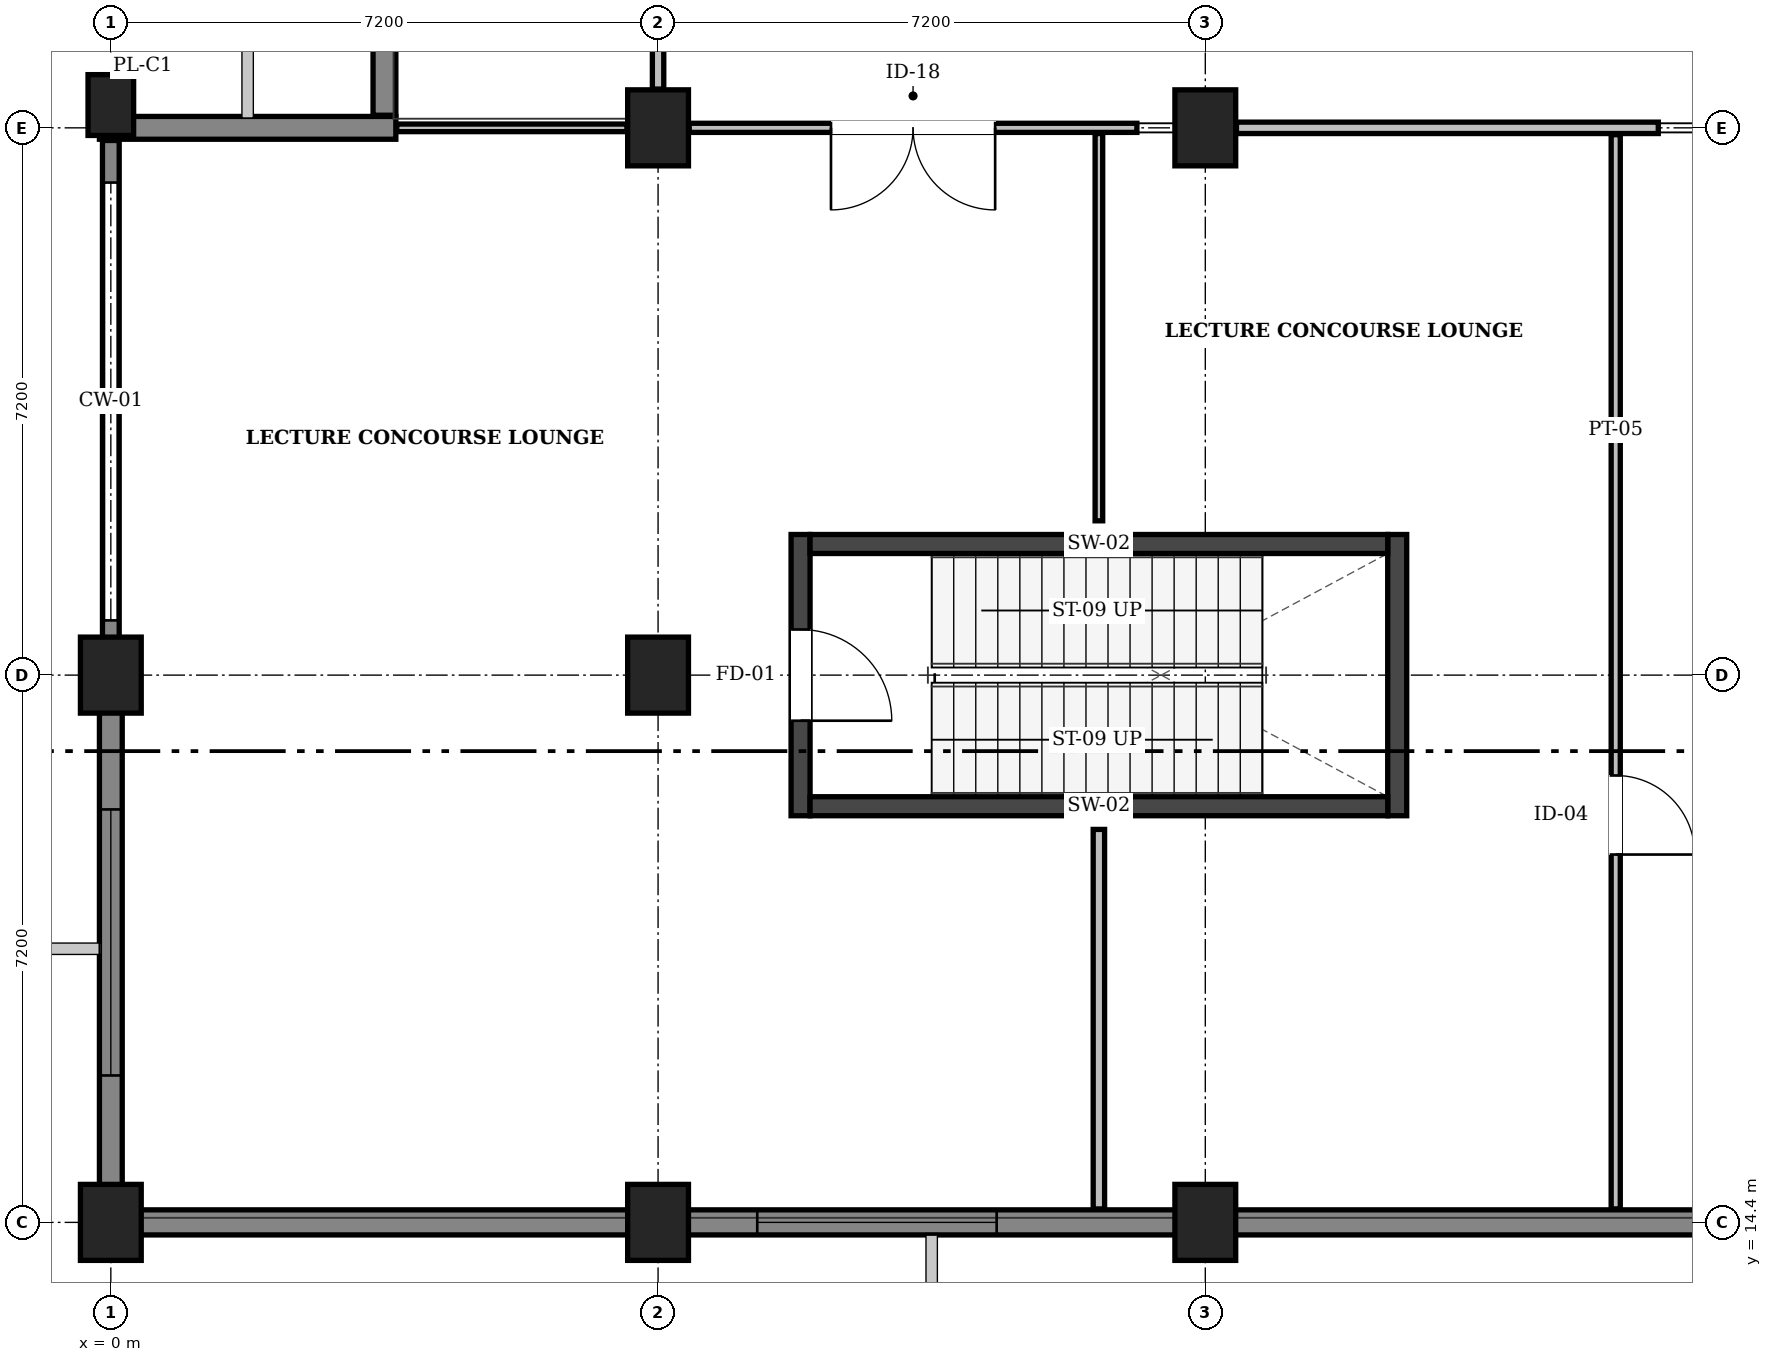
"""IFC4 building model, lengths in metres.
Left out: names, types, materials, properties, quantities, classifications, styles, units other than length and angle.
Written with IfcOpenShell. Run it as: python <this file> out.ifc"""

import sys

from ifc_helpers import new_model, si_unit, direction, frame, frame_2d, origin, origin_2d, place, context, subcontext, project, spatial, rectangle, extrude, element, fill, save


model = new_model("IFC4")
c1 = context("Model", 3, precision=1e-05, world=origin(), true_north=direction((0.0, 1.0)))
c2 = subcontext(c1, "Body", "Model", "MODEL_VIEW")
j1 = project(units=[si_unit("LENGTHUNIT", "METRE"), si_unit("PLANEANGLEUNIT", "RADIAN")], contexts=[c1])
p1 = place(None, origin())
s1 = spatial("IfcSite", under=j1, at=p1, CompositionType="ELEMENT")
p2 = place(p1, origin())
s2 = spatial("IfcBuilding", under=s1, at=p2, CompositionType="ELEMENT")
p3 = place(p2, frame((0.0, 0.0, 4.8)))
s3 = spatial("IfcBuildingStorey", under=s2, at=p3, CompositionType="ELEMENT", Elevation=4.8)
for number, where, z_axis, x_axis in (
    (1, (0.0, 14.4, 0.0), (0.0, 0.0, 1.0), (1.0, 0.0, 0.0)),
    (2, (0.0, 21.6, 0.0), (0.0, 0.0, 1.0), (1.0, 0.0, 0.0)),
):
    element("IfcColumn", number, at=place(p3, frame(where, z_axis=z_axis, x_axis=x_axis)), inside=s3, PredefinedType="COLUMN", context=c2, shape_type="SweptSolid", body=[
        extrude(rectangle(XDim=0.8, YDim=1.0, at=origin_2d()), origin(), (0.0, 0.0, 1.0), 4.8),
    ])
p4 = place(p3, frame((0.0, 29.1, 0.028), z_axis=(0.0, -0.062750190136, 0.998029264921), x_axis=(1.0, 0.0, 0.0)))
e3 = element("IfcColumn", 3, at=p4, inside=s3, PredefinedType="PILASTER", context=c2, shape_type="SweptSolid", body=[
    extrude(rectangle(XDim=0.6, YDim=0.8, at=origin_2d()), origin(), (0.0, 0.0, 1.0), 4.782),
])
for number, where, z_axis, x_axis in (
    (4, (7.2, 14.4, 0.0), (0.0, 0.0, 1.0), (1.0, 0.0, 0.0)),
    (5, (7.2, 21.6, 0.0), (0.0, 0.0, 1.0), (1.0, 0.0, 0.0)),
    (6, (7.2, 28.8, 0.0), (0.0, 0.0, 1.0), (1.0, 0.0, 0.0)),
    (7, (14.4, 14.4, 0.0), (0.0, 0.0, 1.0), (1.0, 0.0, 0.0)),
    (8, (14.4, 28.8, 0.0), (0.0, 0.0, 1.0), (1.0, 0.0, 0.0)),
):
    element("IfcColumn", number, at=place(p3, frame(where, z_axis=z_axis, x_axis=x_axis)), inside=s3, PredefinedType="COLUMN", context=c2, shape_type="SweptSolid", body=[
        extrude(rectangle(XDim=0.8, YDim=1.0, at=origin_2d()), origin(), (0.0, 0.0, 1.0), 4.8),
    ])
p5 = place(p3, frame((21.6, 14.4, 0.0), z_axis=(0.0, 0.0, 1.0), x_axis=(-1.0, 0.0, 0.0)))
e9 = element("IfcWall", 9, at=p5, inside=s3, PredefinedType="SOLIDWALL", context=c2, shape_type="SweptSolid", body=[
    extrude(rectangle(XDim=7.2, YDim=0.33, at=frame_2d((3.6, 0.0))), origin(), (0.0, 0.0, 1.0), 4.52),
])
p6 = place(p3, frame((14.4, 14.4, 0.0), z_axis=(0.0, 0.0, 1.0), x_axis=(-1.0, 0.0, 0.0)))
e10 = element("IfcWall", 10, at=p6, inside=s3, PredefinedType="SOLIDWALL", context=c2, shape_type="SweptSolid", body=[
    extrude(rectangle(XDim=7.2, YDim=0.33, at=frame_2d((3.6, 0.0))), origin(), (0.0, 0.0, 1.0), 4.52),
])
p7 = place(p6, frame((2.745, 0.0, 0.95)))
e11 = element("IfcOpeningElement", 11, at=p7, cuts=e10, PredefinedType="OPENING", context=c2, shape_type="SweptSolid", body=[
    extrude(rectangle(XDim=3.15, YDim=1.8, at=frame_2d((1.575, 0.9))), frame((0.0, 0.177, 0.0), z_axis=(0.0, -1.0, 0.0), x_axis=(1.0, 0.0, 0.0)), (0.0, 0.0, 1.0), 0.354),
])
p8 = place(p3, frame((7.2, 14.4, 0.0), z_axis=(0.0, 0.0, 1.0), x_axis=(-1.0, 0.0, 0.0)))
e12 = element("IfcWall", 12, at=p8, inside=s3, PredefinedType="SOLIDWALL", context=c2, shape_type="SweptSolid", body=[
    extrude(rectangle(XDim=7.35, YDim=0.33, at=frame_2d((3.675, 0.0))), origin(), (0.0, 0.0, 1.0), 4.52),
])
p9 = place(p3, frame((0.0, 14.566, 0.0), z_axis=(0.0, 0.0, 1.0), x_axis=(0.0, 1.0, 0.0)))
e13 = element("IfcWall", 13, at=p9, inside=s3, PredefinedType="SOLIDWALL", context=c2, shape_type="SweptSolid", body=[
    extrude(rectangle(XDim=7.034, YDim=0.3, at=frame_2d((3.517, 0.0))), origin(), (0.0, 0.0, 1.0), 4.52),
])
p10 = place(p9, frame((1.767, 0.0, 0.95)))
e14 = element("IfcOpeningElement", 14, at=p10, cuts=e13, PredefinedType="OPENING", context=c2, shape_type="SweptSolid", body=[
    extrude(rectangle(XDim=3.5, YDim=1.8, at=frame_2d((1.75, 0.9))), frame((0.0, 0.162, 0.0), z_axis=(0.0, -1.0, 0.0), x_axis=(1.0, 0.0, 0.0)), (0.0, 0.0, 1.0), 0.324),
])
p11 = place(p3, frame((0.0, 21.6, 0.0), z_axis=(0.0, 0.0, 1.0), x_axis=(0.0, 1.0, 0.0)))
e15 = element("IfcWall", 15, at=p11, inside=s3, PredefinedType="SOLIDWALL", context=c2, shape_type="SweptSolid", body=[
    extrude(rectangle(XDim=7.034, YDim=0.22, at=frame_2d((3.517, 0.0))), origin(), (0.0, 0.0, 1.0), 1.24),
])
p12 = place(p3, frame((-0.15, 28.8, 0.0), z_axis=(0.0, 0.0, 1.0), x_axis=(1.0, 0.0, 0.0)))
e16 = element("IfcWall", 16, at=p12, inside=s3, PredefinedType="SOLIDWALL", context=c2, shape_type="SweptSolid", body=[
    extrude(rectangle(XDim=3.9, YDim=0.3, at=frame_2d((1.95, 0.0))), origin(), (0.0, 0.0, 1.0), 4.52),
])
p13 = place(p3, frame((3.6, 28.966, 0.0), z_axis=(0.0, 0.0, 1.0), x_axis=(0.0, 1.0, 0.0)))
e17 = element("IfcWall", 17, at=p13, inside=s3, PredefinedType="SOLIDWALL", context=c2, shape_type="SweptSolid", body=[
    extrude(rectangle(XDim=7.034, YDim=0.3, at=frame_2d((3.517, 0.0))), origin(), (0.0, 0.0, 1.0), 4.52),
])
p14 = place(p13, frame((1.592, 0.0, 0.95)))
e18 = element("IfcOpeningElement", 18, at=p14, cuts=e17, PredefinedType="OPENING", context=c2, shape_type="SweptSolid", body=[
    extrude(rectangle(XDim=3.85, YDim=1.8, at=frame_2d((1.925, 0.9))), frame((0.0, 0.162, 0.0), z_axis=(0.0, -1.0, 0.0), x_axis=(1.0, 0.0, 0.0)), (0.0, 0.0, 1.0), 0.324),
])
p15 = place(p3, frame((9.075, 19.75, 0.0), z_axis=(0.0, 0.0, 1.0), x_axis=(0.0, 1.0, 0.0)))
e19 = element("IfcWall", 19, at=p15, inside=s3, PredefinedType="SHEAR", context=c2, shape_type="SweptSolid", body=[
    extrude(rectangle(XDim=3.7, YDim=0.25, at=frame_2d((1.85, 0.0))), origin(), (0.0, 0.0, 1.0), 4.55),
])
p16 = place(p15, frame((1.25, 0.0, 0.0)))
e20 = element("IfcOpeningElement", 20, at=p16, cuts=e19, PredefinedType="OPENING", context=c2, shape_type="SweptSolid", body=[
    extrude(rectangle(XDim=1.2, YDim=2.15, at=frame_2d((0.6, 1.075))), frame((0.0, 0.137, 0.0), z_axis=(0.0, -1.0, 0.0), x_axis=(1.0, 0.0, 0.0)), (0.0, 0.0, 1.0), 0.274),
])
p17 = place(p3, frame((16.925, 19.75, 0.0), z_axis=(0.0, 0.0, 1.0), x_axis=(0.0, 1.0, 0.0)))
e21 = element("IfcWall", 21, at=p17, inside=s3, PredefinedType="SHEAR", context=c2, shape_type="SweptSolid", body=[
    extrude(rectangle(XDim=3.7, YDim=0.25, at=frame_2d((1.85, 0.0))), origin(), (0.0, 0.0, 1.0), 4.55),
])
for number, where, z_axis, x_axis in (
    (22, (9.2, 19.875, 0.0), (0.0, 0.0, 1.0), (1.0, 0.0, 0.0)),
    (23, (9.2, 23.325, 0.0), (0.0, 0.0, 1.0), (1.0, 0.0, 0.0)),
):
    element("IfcWall", number, at=place(p3, frame(where, z_axis=z_axis, x_axis=x_axis)), inside=s3, PredefinedType="SHEAR", context=c2, shape_type="SweptSolid", body=[
        extrude(rectangle(XDim=7.6, YDim=0.25, at=frame_2d((3.8, 0.0))), origin(), (0.0, 0.0, 1.0), 4.55),
    ])
p18 = place(p3, frame((14.81, 28.8, 0.0), z_axis=(0.0, 0.0, 1.0), x_axis=(1.0, 0.0, 0.0)))
e24 = element("IfcWall", 24, at=p18, inside=s3, PredefinedType="PARTITIONING", context=c2, shape_type="SweptSolid", body=[
    extrude(rectangle(XDim=5.55, YDim=0.15, at=frame_2d((2.775, 0.0))), origin(), (0.0, 0.0, 1.0), 3.9),
])
p19 = place(p3, frame((7.61, 28.8, 0.0), z_axis=(0.0, 0.0, 1.0), x_axis=(1.0, 0.0, 0.0)))
e25 = element("IfcWall", 25, at=p19, inside=s3, PredefinedType="PARTITIONING", context=c2, shape_type="SweptSolid", body=[
    extrude(rectangle(XDim=5.89, YDim=0.12, at=frame_2d((2.945, 0.0))), origin(), (0.0, 0.0, 1.0), 2.98),
])
p20 = place(p19, frame((1.865, 0.0, 0.0)))
e26 = element("IfcOpeningElement", 26, at=p20, cuts=e25, PredefinedType="OPENING", context=c2, shape_type="SweptSolid", body=[
    extrude(rectangle(XDim=2.16, YDim=2.35, at=frame_2d((1.08, 1.175))), frame((0.0, 0.072, 0.0), z_axis=(0.0, -1.0, 0.0), x_axis=(1.0, 0.0, 0.0)), (0.0, 0.0, 1.0), 0.144),
])
p21 = place(p3, frame((7.2, 29.31, 0.0), z_axis=(0.0, 0.0, 1.0), x_axis=(0.0, 1.0, 0.0)))
e27 = element("IfcWall", 27, at=p21, inside=s3, PredefinedType="PARTITIONING", context=c2, shape_type="SweptSolid", body=[
    extrude(rectangle(XDim=6.255, YDim=0.15, at=frame_2d((3.127, 0.0))), origin(), (0.0, 0.0, 1.0), 4.46),
])
p22 = place(p3, frame((13.0, 23.63, 0.0), z_axis=(0.0, 0.0, 1.0), x_axis=(0.0, 1.0, 0.0)))
e28 = element("IfcWall", 28, at=p22, inside=s3, PredefinedType="PARTITIONING", context=c2, shape_type="SweptSolid", body=[
    extrude(rectangle(XDim=5.095, YDim=0.1, at=frame_2d((2.548, 0.0))), origin(), (0.0, 0.0, 1.0), 4.46),
])
p23 = place(p3, frame((13.0, 14.577, 0.0), z_axis=(0.0, 0.0, 1.0), x_axis=(0.0, 1.0, 0.0)))
e29 = element("IfcWall", 29, at=p23, inside=s3, PredefinedType="PARTITIONING", context=c2, shape_type="SweptSolid", body=[
    extrude(rectangle(XDim=4.993, YDim=0.15, at=frame_2d((2.497, 0.0))), origin(), (0.0, 0.0, 1.0), 4.46),
])
p24 = place(p3, frame((19.8, 14.577, 0.0), z_axis=(0.0, 0.0, 1.0), x_axis=(0.0, 1.0, 0.0)))
e30 = element("IfcWall", 30, at=p24, inside=s3, PredefinedType="PARTITIONING", context=c2, shape_type="SweptSolid", body=[
    extrude(rectangle(XDim=14.133, YDim=0.12, at=frame_2d((7.066, 0.0))), origin(), (0.0, 0.0, 1.0), 4.46),
])
p25 = place(p24, frame((4.663, 0.0, 0.0)))
e31 = element("IfcOpeningElement", 31, at=p25, cuts=e30, PredefinedType="OPENING", context=c2, shape_type="SweptSolid", body=[
    extrude(rectangle(XDim=1.04, YDim=2.18, at=frame_2d((0.52, 1.09))), frame((0.0, 0.072, 0.0), z_axis=(0.0, -1.0, 0.0), x_axis=(1.0, 0.0, 0.0)), (0.0, 0.0, 1.0), 0.144),
])
p26 = place(p3, frame((3.762, 28.8, 0.0), z_axis=(0.0, 0.0, 1.0), x_axis=(1.0, 0.0, 0.0)))
e32 = element("IfcWall", 32, at=p26, inside=s3, PredefinedType="PARTITIONING", context=c2, shape_type="SweptSolid", body=[
    extrude(rectangle(XDim=3.028, YDim=0.1, at=frame_2d((1.514, 0.0))), origin(), (0.0, 0.0, 1.0), 3.9),
])
p27 = place(p7, origin())
e33 = element("IfcWindow", 33, at=p27, inside=s3, PartitioningType="SINGLE_PANEL", PredefinedType="WINDOW", context=c2, shape_type="SweptSolid", body=[
    extrude(rectangle(XDim=3.15, YDim=1.8, at=frame_2d((1.575, 0.9))), frame((0.0, 0.03, 0.0), z_axis=(0.0, -1.0, 0.0), x_axis=(1.0, 0.0, 0.0)), (0.0, 0.0, 1.0), 0.06),
])
fill(e11, e33)
p28 = place(p10, origin())
e34 = element("IfcWindow", 34, at=p28, inside=s3, PartitioningType="SINGLE_PANEL", PredefinedType="WINDOW", context=c2, shape_type="SweptSolid", body=[
    extrude(rectangle(XDim=3.5, YDim=1.8, at=frame_2d((1.75, 0.9))), frame((0.0, 0.03, 0.0), z_axis=(0.0, -1.0, 0.0), x_axis=(1.0, 0.0, 0.0)), (0.0, 0.0, 1.0), 0.06),
])
fill(e14, e34)
p29 = place(p16, frame((1.2, 0.0, 0.0), z_axis=(0.0, 0.0, 1.0), x_axis=(-1.0, 0.0, 0.0)))
e35 = element("IfcDoor", 35, at=p29, inside=s3, OperationType="SINGLE_SWING_RIGHT", PredefinedType="DOOR", context=c2, shape_type="SweptSolid", body=[
    extrude(rectangle(XDim=1.2, YDim=2.15, at=frame_2d((0.6, 1.075))), frame((0.0, 0.025, 0.0), z_axis=(0.0, -1.0, 0.0), x_axis=(1.0, 0.0, 0.0)), (0.0, 0.0, 1.0), 0.05),
])
fill(e20, e35)
p30 = place(p25, frame((1.04, 0.0, 0.0), z_axis=(0.0, 0.0, 1.0), x_axis=(-1.0, 0.0, 0.0)))
e36 = element("IfcDoor", 36, at=p30, inside=s3, OperationType="SINGLE_SWING_RIGHT", PredefinedType="DOOR", context=c2, shape_type="SweptSolid", body=[
    extrude(rectangle(XDim=1.04, YDim=2.18, at=frame_2d((0.52, 1.09))), frame((0.0, 0.025, 0.0), z_axis=(0.0, -1.0, 0.0), x_axis=(1.0, 0.0, 0.0)), (0.0, 0.0, 1.0), 0.05),
])
fill(e31, e36)
p31 = place(p20, frame((2.16, 0.0, 0.0), z_axis=(0.0, 0.0, 1.0), x_axis=(-1.0, 0.0, 0.0)))
e37 = element("IfcDoor", 37, at=p31, inside=s3, OperationType="DOUBLE_DOOR_SINGLE_SWING", PredefinedType="DOOR", context=c2, shape_type="SweptSolid", body=[
    extrude(rectangle(XDim=2.16, YDim=2.35, at=frame_2d((1.08, 1.175))), frame((0.0, 0.025, 0.0), z_axis=(0.0, -1.0, 0.0), x_axis=(1.0, 0.0, 0.0)), (0.0, 0.0, 1.0), 0.05),
])
fill(e26, e37)
save(model, sys.argv[1])
